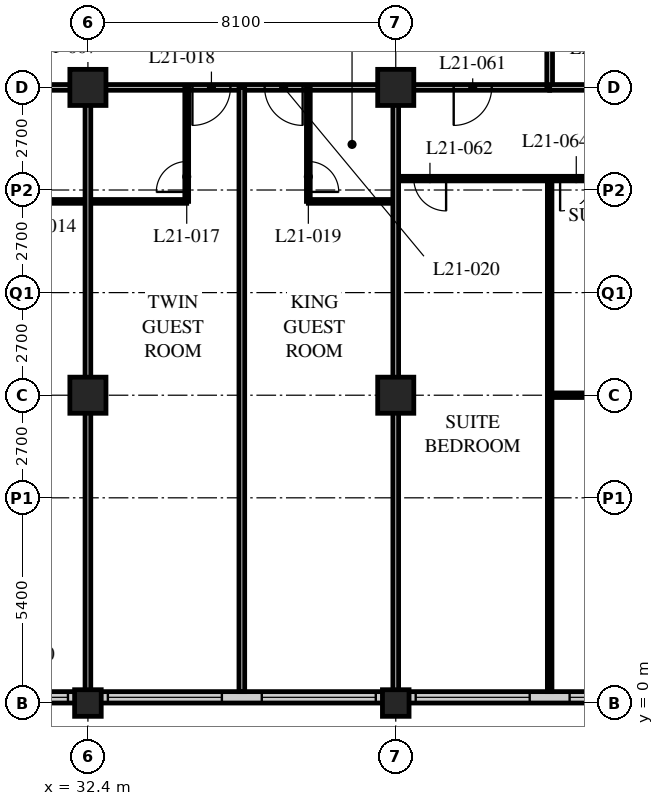
"""IFC4 building model, lengths in metres.
Left out: names, types, materials, properties, quantities, classifications, styles, units other than length and angle.
Written with IfcOpenShell. Run it as: python <this file> out.ifc"""

import sys

from ifc_helpers import new_model, si_unit, direction, frame, frame_2d, origin, origin_2d, place, context, subcontext, project, spatial, rectangle, hollow_rectangle, extrude, element, fill, save


model = new_model("IFC4")
c1 = context("Model", 3, precision=1e-05, world=origin(), true_north=direction((0.0, 1.0)))
c2 = subcontext(c1, "Body", "Model", "MODEL_VIEW")
j1 = project(units=[si_unit("LENGTHUNIT", "METRE"), si_unit("PLANEANGLEUNIT", "RADIAN")], contexts=[c1])
p1 = place(None, origin())
s1 = spatial("IfcSite", under=j1, at=p1, CompositionType="ELEMENT")
p2 = place(p1, origin())
s2 = spatial("IfcBuilding", under=s1, at=p2, CompositionType="ELEMENT")
p3 = place(p2, frame((0.0, 0.0, 84.0)))
s3 = spatial("IfcBuildingStorey", under=s2, at=p3, CompositionType="ELEMENT", Elevation=84.0)
p4 = place(p3, frame((32.4, 0.0, 0.0), z_axis=(0.0, 0.0, 1.0), x_axis=(1.0, 0.0, 0.0)))
e1 = element("IfcColumn", 1, at=p4, inside=s3, PredefinedType="COLUMN", context=c2, shape_type="SweptSolid", body=[
    extrude(hollow_rectangle(XDim=0.7, YDim=0.7, WallThickness=0.06, at=origin_2d()), origin(), (0.0, 0.0, 1.0), 3.4),
])
for number, where, z_axis, x_axis in (
    (2, (32.4, 8.1, 0.0), (0.0, 0.0, 1.0), (1.0, 0.0, 0.0)),
    (3, (32.4, 16.2, 0.0), (0.0, 0.0, 1.0), (1.0, 0.0, 0.0)),
):
    element("IfcColumn", number, at=place(p3, frame(where, z_axis=z_axis, x_axis=x_axis)), inside=s3, PredefinedType="COLUMN", context=c2, shape_type="SweptSolid", body=[
        extrude(hollow_rectangle(XDim=0.95, YDim=0.95, WallThickness=0.095, at=origin_2d()), origin(), (0.0, 0.0, 1.0), 3.4),
    ])
p5 = place(p3, frame((40.5, 0.0, 0.0), z_axis=(0.0, 0.0, 1.0), x_axis=(1.0, 0.0, 0.0)))
e4 = element("IfcColumn", 4, at=p5, inside=s3, PredefinedType="COLUMN", context=c2, shape_type="SweptSolid", body=[
    extrude(hollow_rectangle(XDim=0.7, YDim=0.7, WallThickness=0.06, at=origin_2d()), origin(), (0.0, 0.0, 1.0), 3.4),
])
for number, where, z_axis, x_axis in (
    (5, (40.5, 8.1, 0.0), (0.0, 0.0, 1.0), (1.0, 0.0, 0.0)),
    (6, (40.5, 16.2, 0.0), (0.0, 0.0, 1.0), (1.0, 0.0, 0.0)),
):
    element("IfcColumn", number, at=place(p3, frame(where, z_axis=z_axis, x_axis=x_axis)), inside=s3, PredefinedType="COLUMN", context=c2, shape_type="SweptSolid", body=[
        extrude(hollow_rectangle(XDim=0.95, YDim=0.95, WallThickness=0.095, at=origin_2d()), origin(), (0.0, 0.0, 1.0), 3.4),
    ])
p6 = place(p3, frame((8.4, 0.15, 0.0), z_axis=(0.0, 0.0, 1.0), x_axis=(1.0, 0.0, 0.0)))
e7 = element("IfcWall", 7, at=p6, inside=s3, PredefinedType="SOLIDWALL", context=c2, shape_type="SweptSolid", body=[
    extrude(rectangle(XDim=40.2, YDim=0.3, at=frame_2d((20.1, 0.0))), origin(), (0.0, 0.0, 1.0), 3.19),
])
p7 = place(p6, frame((0.225, 0.0, 0.9)))
e8 = element("IfcOpeningElement", 8, at=p7, cuts=e7, PredefinedType="OPENING", context=c2, shape_type="SweptSolid", body=[
    extrude(rectangle(XDim=3.0, YDim=1.5, at=frame_2d((1.5, 0.75))), frame((0.0, 0.16, 0.0), z_axis=(0.0, -1.0, 0.0), x_axis=(1.0, 0.0, 0.0)), (0.0, 0.0, 1.0), 0.32),
])
p8 = place(p6, frame((4.275, 0.0, 0.9)))
e9 = element("IfcOpeningElement", 9, at=p8, cuts=e7, PredefinedType="OPENING", context=c2, shape_type="SweptSolid", body=[
    extrude(rectangle(XDim=3.0, YDim=1.5, at=frame_2d((1.5, 0.75))), frame((0.0, 0.16, 0.0), z_axis=(0.0, -1.0, 0.0), x_axis=(1.0, 0.0, 0.0)), (0.0, 0.0, 1.0), 0.32),
])
p9 = place(p6, frame((8.325, 0.0, 0.9)))
e10 = element("IfcOpeningElement", 10, at=p9, cuts=e7, PredefinedType="OPENING", context=c2, shape_type="SweptSolid", body=[
    extrude(rectangle(XDim=3.0, YDim=1.5, at=frame_2d((1.5, 0.75))), frame((0.0, 0.16, 0.0), z_axis=(0.0, -1.0, 0.0), x_axis=(1.0, 0.0, 0.0)), (0.0, 0.0, 1.0), 0.32),
])
p10 = place(p6, frame((12.375, 0.0, 0.9)))
e11 = element("IfcOpeningElement", 11, at=p10, cuts=e7, PredefinedType="OPENING", context=c2, shape_type="SweptSolid", body=[
    extrude(rectangle(XDim=3.0, YDim=1.5, at=frame_2d((1.5, 0.75))), frame((0.0, 0.16, 0.0), z_axis=(0.0, -1.0, 0.0), x_axis=(1.0, 0.0, 0.0)), (0.0, 0.0, 1.0), 0.32),
])
p11 = place(p6, frame((16.425, 0.0, 0.9)))
e12 = element("IfcOpeningElement", 12, at=p11, cuts=e7, PredefinedType="OPENING", context=c2, shape_type="SweptSolid", body=[
    extrude(rectangle(XDim=3.0, YDim=1.5, at=frame_2d((1.5, 0.75))), frame((0.0, 0.16, 0.0), z_axis=(0.0, -1.0, 0.0), x_axis=(1.0, 0.0, 0.0)), (0.0, 0.0, 1.0), 0.32),
])
p12 = place(p6, frame((20.475, 0.0, 0.9)))
e13 = element("IfcOpeningElement", 13, at=p12, cuts=e7, PredefinedType="OPENING", context=c2, shape_type="SweptSolid", body=[
    extrude(rectangle(XDim=3.0, YDim=1.5, at=frame_2d((1.5, 0.75))), frame((0.0, 0.16, 0.0), z_axis=(0.0, -1.0, 0.0), x_axis=(1.0, 0.0, 0.0)), (0.0, 0.0, 1.0), 0.32),
])
p13 = place(p6, frame((24.525, 0.0, 0.9)))
e14 = element("IfcOpeningElement", 14, at=p13, cuts=e7, PredefinedType="OPENING", context=c2, shape_type="SweptSolid", body=[
    extrude(rectangle(XDim=3.0, YDim=1.5, at=frame_2d((1.5, 0.75))), frame((0.0, 0.16, 0.0), z_axis=(0.0, -1.0, 0.0), x_axis=(1.0, 0.0, 0.0)), (0.0, 0.0, 1.0), 0.32),
])
p14 = place(p6, frame((28.575, 0.0, 0.9)))
e15 = element("IfcOpeningElement", 15, at=p14, cuts=e7, PredefinedType="OPENING", context=c2, shape_type="SweptSolid", body=[
    extrude(rectangle(XDim=3.0, YDim=1.5, at=frame_2d((1.5, 0.75))), frame((0.0, 0.16, 0.0), z_axis=(0.0, -1.0, 0.0), x_axis=(1.0, 0.0, 0.0)), (0.0, 0.0, 1.0), 0.32),
])
p15 = place(p6, frame((32.625, 0.0, 0.9)))
e16 = element("IfcOpeningElement", 16, at=p15, cuts=e7, PredefinedType="OPENING", context=c2, shape_type="SweptSolid", body=[
    extrude(rectangle(XDim=3.0, YDim=1.5, at=frame_2d((1.5, 0.75))), frame((0.0, 0.16, 0.0), z_axis=(0.0, -1.0, 0.0), x_axis=(1.0, 0.0, 0.0)), (0.0, 0.0, 1.0), 0.32),
])
p16 = place(p6, frame((36.675, 0.0, 0.9)))
e17 = element("IfcOpeningElement", 17, at=p16, cuts=e7, PredefinedType="OPENING", context=c2, shape_type="SweptSolid", body=[
    extrude(rectangle(XDim=3.0, YDim=1.5, at=frame_2d((1.5, 0.75))), frame((0.0, 0.16, 0.0), z_axis=(0.0, -1.0, 0.0), x_axis=(1.0, 0.0, 0.0)), (0.0, 0.0, 1.0), 0.32),
])
p17 = place(p3, frame((12.15, 16.2, 0.0), z_axis=(0.0, 0.0, 1.0), x_axis=(1.0, 0.0, 0.0)))
e18 = element("IfcWall", 18, at=p17, inside=s3, PredefinedType="PARTITIONING", context=c2, shape_type="SweptSolid", body=[
    extrude(rectangle(XDim=32.4, YDim=0.15, at=frame_2d((16.2, 0.0))), origin(), (0.0, 0.0, 1.0), 2.428),
])
p18 = place(p17, frame((6.5, 0.0, 0.0)))
e19 = element("IfcOpeningElement", 19, at=p18, cuts=e18, PredefinedType="OPENING", context=c2, shape_type="SweptSolid", body=[
    extrude(rectangle(XDim=1.0, YDim=2.1, at=frame_2d((0.5, 1.05))), frame((0.0, 0.085, 0.0), z_axis=(0.0, -1.0, 0.0), x_axis=(1.0, 0.0, 0.0)), (0.0, 0.0, 1.0), 0.17),
])
p19 = place(p17, frame((8.4, 0.0, 0.0)))
e20 = element("IfcOpeningElement", 20, at=p19, cuts=e18, PredefinedType="OPENING", context=c2, shape_type="SweptSolid", body=[
    extrude(rectangle(XDim=1.0, YDim=2.1, at=frame_2d((0.5, 1.05))), frame((0.0, 0.085, 0.0), z_axis=(0.0, -1.0, 0.0), x_axis=(1.0, 0.0, 0.0)), (0.0, 0.0, 1.0), 0.17),
])
p20 = place(p17, frame((14.9, 0.0, 0.0)))
e21 = element("IfcOpeningElement", 21, at=p20, cuts=e18, PredefinedType="OPENING", context=c2, shape_type="SweptSolid", body=[
    extrude(rectangle(XDim=1.0, YDim=2.1, at=frame_2d((0.5, 1.05))), frame((0.0, 0.085, 0.0), z_axis=(0.0, -1.0, 0.0), x_axis=(1.0, 0.0, 0.0)), (0.0, 0.0, 1.0), 0.17),
])
p21 = place(p17, frame((16.5, 0.0, 0.0)))
e22 = element("IfcOpeningElement", 22, at=p21, cuts=e18, PredefinedType="OPENING", context=c2, shape_type="SweptSolid", body=[
    extrude(rectangle(XDim=1.0, YDim=2.1, at=frame_2d((0.5, 1.05))), frame((0.0, 0.085, 0.0), z_axis=(0.0, -1.0, 0.0), x_axis=(1.0, 0.0, 0.0)), (0.0, 0.0, 1.0), 0.17),
])
p22 = place(p17, frame((23.0, 0.0, 0.0)))
e23 = element("IfcOpeningElement", 23, at=p22, cuts=e18, PredefinedType="OPENING", context=c2, shape_type="SweptSolid", body=[
    extrude(rectangle(XDim=1.0, YDim=2.1, at=frame_2d((0.5, 1.05))), frame((0.0, 0.085, 0.0), z_axis=(0.0, -1.0, 0.0), x_axis=(1.0, 0.0, 0.0)), (0.0, 0.0, 1.0), 0.17),
])
p23 = place(p17, frame((24.9, 0.0, 0.0)))
e24 = element("IfcOpeningElement", 24, at=p23, cuts=e18, PredefinedType="OPENING", context=c2, shape_type="SweptSolid", body=[
    extrude(rectangle(XDim=1.0, YDim=2.1, at=frame_2d((0.5, 1.05))), frame((0.0, 0.085, 0.0), z_axis=(0.0, -1.0, 0.0), x_axis=(1.0, 0.0, 0.0)), (0.0, 0.0, 1.0), 0.17),
])
p24 = place(p17, frame((1.525, 0.0, 0.0)))
e25 = element("IfcOpeningElement", 25, at=p24, cuts=e18, PredefinedType="OPENING", context=c2, shape_type="SweptSolid", body=[
    extrude(rectangle(XDim=1.0, YDim=2.1, at=frame_2d((0.5, 1.05))), frame((0.0, 0.085, 0.0), z_axis=(0.0, -1.0, 0.0), x_axis=(1.0, 0.0, 0.0)), (0.0, 0.0, 1.0), 0.17),
])
p25 = place(p17, frame((29.875, 0.0, 0.0)))
e26 = element("IfcOpeningElement", 26, at=p25, cuts=e18, PredefinedType="OPENING", context=c2, shape_type="SweptSolid", body=[
    extrude(rectangle(XDim=1.0, YDim=2.1, at=frame_2d((0.5, 1.05))), frame((0.0, 0.085, 0.0), z_axis=(0.0, -1.0, 0.0), x_axis=(1.0, 0.0, 0.0)), (0.0, 0.0, 1.0), 0.17),
])
p26 = place(p3, frame((44.55, 16.2, 0.0), z_axis=(0.0, 0.0, 1.0), x_axis=(0.0, 1.0, 0.0)))
e27 = element("IfcWall", 27, at=p26, inside=s3, PredefinedType="PARTITIONING", context=c2, shape_type="SweptSolid", body=[
    extrude(rectangle(XDim=26.1, YDim=0.15, at=frame_2d((13.05, 0.0))), origin(), (0.0, 0.0, 1.0), 3.19),
])
p27 = place(p26, frame((2.75, 0.0, 0.0)))
e28 = element("IfcOpeningElement", 28, at=p27, cuts=e27, PredefinedType="OPENING", context=c2, shape_type="SweptSolid", body=[
    extrude(rectangle(XDim=1.0, YDim=2.1, at=frame_2d((0.5, 1.05))), frame((0.0, 0.085, 0.0), z_axis=(0.0, -1.0, 0.0), x_axis=(1.0, 0.0, 0.0)), (0.0, 0.0, 1.0), 0.17),
])
p28 = place(p26, frame((6.5, 0.0, 0.0)))
e29 = element("IfcOpeningElement", 29, at=p28, cuts=e27, PredefinedType="OPENING", context=c2, shape_type="SweptSolid", body=[
    extrude(rectangle(XDim=1.0, YDim=2.1, at=frame_2d((0.5, 1.05))), frame((0.0, 0.085, 0.0), z_axis=(0.0, -1.0, 0.0), x_axis=(1.0, 0.0, 0.0)), (0.0, 0.0, 1.0), 0.17),
])
p29 = place(p26, frame((10.0, 0.0, 0.0)))
e30 = element("IfcOpeningElement", 30, at=p29, cuts=e27, PredefinedType="OPENING", context=c2, shape_type="SweptSolid", body=[
    extrude(rectangle(XDim=1.0, YDim=2.1, at=frame_2d((0.5, 1.05))), frame((0.0, 0.085, 0.0), z_axis=(0.0, -1.0, 0.0), x_axis=(1.0, 0.0, 0.0)), (0.0, 0.0, 1.0), 0.17),
])
p30 = place(p26, frame((18.1, 0.0, 0.0)))
e31 = element("IfcOpeningElement", 31, at=p30, cuts=e27, PredefinedType="OPENING", context=c2, shape_type="SweptSolid", body=[
    extrude(rectangle(XDim=1.0, YDim=2.1, at=frame_2d((0.5, 1.05))), frame((0.0, 0.085, 0.0), z_axis=(0.0, -1.0, 0.0), x_axis=(1.0, 0.0, 0.0)), (0.0, 0.0, 1.0), 0.17),
])
p31 = place(p3, frame((29.8, 13.2, 0.0), z_axis=(0.0, 0.0, 1.0), x_axis=(1.0, 0.0, 0.0)))
e32 = element("IfcWall", 32, at=p31, inside=s3, PredefinedType="PARTITIONING", context=c2, shape_type="SweptSolid", body=[
    extrude(rectangle(XDim=5.2, YDim=0.1, at=frame_2d((2.6, 0.0))), origin(), (0.0, 0.0, 1.0), 3.19),
])
p32 = place(p3, frame((32.4, 16.2, 0.0), z_axis=(0.0, 0.0, 1.0), x_axis=(0.0, -1.0, 0.0)))
e33 = element("IfcWall", 33, at=p32, inside=s3, PredefinedType="PARTITIONING", context=c2, shape_type="SweptSolid", body=[
    extrude(rectangle(XDim=15.9, YDim=0.15, at=frame_2d((7.95, 0.0))), origin(), (0.0, 0.0, 1.0), 2.428),
])
p33 = place(p3, frame((35.0, 16.2, 0.0), z_axis=(0.0, 0.0, 1.0), x_axis=(0.0, -1.0, 0.0)))
e34 = element("IfcWall", 34, at=p33, inside=s3, PredefinedType="PARTITIONING", context=c2, shape_type="SweptSolid", body=[
    extrude(rectangle(XDim=3.0, YDim=0.1, at=frame_2d((1.5, 0.0))), origin(), (0.0, 0.0, 1.0), 3.19),
])
p34 = place(p33, frame((1.95, 0.0, 0.0)))
e35 = element("IfcOpeningElement", 35, at=p34, cuts=e34, PredefinedType="OPENING", context=c2, shape_type="SweptSolid", body=[
    extrude(rectangle(XDim=0.8, YDim=2.1, at=frame_2d((0.4, 1.05))), frame((0.0, 0.06, 0.0), z_axis=(0.0, -1.0, 0.0), x_axis=(1.0, 0.0, 0.0)), (0.0, 0.0, 1.0), 0.12),
])
p35 = place(p3, frame((36.45, 16.2, 0.0), z_axis=(0.0, 0.0, 1.0), x_axis=(0.0, -1.0, 0.0)))
e36 = element("IfcWall", 36, at=p35, inside=s3, PredefinedType="PARTITIONING", context=c2, shape_type="SweptSolid", body=[
    extrude(rectangle(XDim=15.9, YDim=0.15, at=frame_2d((7.95, 0.0))), origin(), (0.0, 0.0, 1.0), 3.19),
])
p36 = place(p3, frame((38.2, 13.2, 0.0), z_axis=(0.0, 0.0, 1.0), x_axis=(1.0, 0.0, 0.0)))
e37 = element("IfcWall", 37, at=p36, inside=s3, PredefinedType="PARTITIONING", context=c2, shape_type="SweptSolid", body=[
    extrude(rectangle(XDim=2.3, YDim=0.1, at=frame_2d((1.15, 0.0))), origin(), (0.0, 0.0, 1.0), 3.19),
])
p37 = place(p3, frame((38.2, 16.2, 0.0), z_axis=(0.0, 0.0, 1.0), x_axis=(0.0, -1.0, 0.0)))
e38 = element("IfcWall", 38, at=p37, inside=s3, PredefinedType="PARTITIONING", context=c2, shape_type="SweptSolid", body=[
    extrude(rectangle(XDim=3.0, YDim=0.1, at=frame_2d((1.5, 0.0))), origin(), (0.0, 0.0, 1.0), 3.19),
])
p38 = place(p37, frame((1.95, 0.0, 0.0)))
e39 = element("IfcOpeningElement", 39, at=p38, cuts=e38, PredefinedType="OPENING", context=c2, shape_type="SweptSolid", body=[
    extrude(rectangle(XDim=0.8, YDim=2.1, at=frame_2d((0.4, 1.05))), frame((0.0, 0.06, 0.0), z_axis=(0.0, -1.0, 0.0), x_axis=(1.0, 0.0, 0.0)), (0.0, 0.0, 1.0), 0.12),
])
p39 = place(p3, frame((40.5, 13.8, 0.0), z_axis=(0.0, 0.0, 1.0), x_axis=(1.0, 0.0, 0.0)))
e40 = element("IfcWall", 40, at=p39, inside=s3, PredefinedType="PARTITIONING", context=c2, shape_type="SweptSolid", body=[
    extrude(rectangle(XDim=8.05, YDim=0.12, at=frame_2d((4.025, 0.0))), origin(), (0.0, 0.0, 1.0), 3.19),
])
p40 = place(p39, frame((0.475, 0.0, 0.0)))
e41 = element("IfcOpeningElement", 41, at=p40, cuts=e40, PredefinedType="OPENING", context=c2, shape_type="SweptSolid", body=[
    extrude(rectangle(XDim=0.85, YDim=2.1, at=frame_2d((0.425, 1.05))), frame((0.0, 0.07, 0.0), z_axis=(0.0, -1.0, 0.0), x_axis=(1.0, 0.0, 0.0)), (0.0, 0.0, 1.0), 0.14),
])
p41 = place(p39, frame((4.325, 0.0, 0.0)))
e42 = element("IfcOpeningElement", 42, at=p41, cuts=e40, PredefinedType="OPENING", context=c2, shape_type="SweptSolid", body=[
    extrude(rectangle(XDim=0.85, YDim=2.1, at=frame_2d((0.425, 1.05))), frame((0.0, 0.07, 0.0), z_axis=(0.0, -1.0, 0.0), x_axis=(1.0, 0.0, 0.0)), (0.0, 0.0, 1.0), 0.14),
])
p42 = place(p3, frame((44.55, 13.8, 0.0), z_axis=(0.0, 0.0, 1.0), x_axis=(0.0, -1.0, 0.0)))
e43 = element("IfcWall", 43, at=p42, inside=s3, PredefinedType="PARTITIONING", context=c2, shape_type="SweptSolid", body=[
    extrude(rectangle(XDim=13.5, YDim=0.12, at=frame_2d((6.75, 0.0))), origin(), (0.0, 0.0, 1.0), 3.19),
])
p43 = place(p3, frame((44.55, 16.2, 0.0), z_axis=(0.0, 0.0, 1.0), x_axis=(1.0, 0.0, 0.0)))
e44 = element("IfcWall", 44, at=p43, inside=s3, PredefinedType="PARTITIONING", context=c2, shape_type="SweptSolid", body=[
    extrude(rectangle(XDim=11.85, YDim=0.15, at=frame_2d((5.925, 0.0))), origin(), (0.0, 0.0, 1.0), 2.428),
])
p44 = place(p3, frame((40.5, 16.2, 0.0), z_axis=(0.0, 0.0, 1.0), x_axis=(0.0, -1.0, 0.0)))
e45 = element("IfcWall", 45, at=p44, inside=s3, PredefinedType="PARTITIONING", context=c2, shape_type="SweptSolid", body=[
    extrude(rectangle(XDim=15.9, YDim=0.15, at=frame_2d((7.95, 0.0))), origin(), (0.0, 0.0, 1.0), 2.428),
])
p45 = place(p3, frame((44.55, 8.1, 0.0), z_axis=(0.0, 0.0, 1.0), x_axis=(1.0, 0.0, 0.0)))
e46 = element("IfcWall", 46, at=p45, inside=s3, PredefinedType="PARTITIONING", context=c2, shape_type="SweptSolid", body=[
    extrude(rectangle(XDim=3.575, YDim=0.12, at=frame_2d((1.788, 0.0))), origin(), (0.0, 0.0, 1.0), 2.428),
])
p46 = place(p12, origin())
e47 = element("IfcWindow", 47, at=p46, inside=s3, PartitioningType="SINGLE_PANEL", PredefinedType="WINDOW", context=c2, shape_type="SweptSolid", body=[
    extrude(rectangle(XDim=3.0, YDim=1.5, at=frame_2d((1.5, 0.75))), frame((0.0, 0.03, 0.0), z_axis=(0.0, -1.0, 0.0), x_axis=(1.0, 0.0, 0.0)), (0.0, 0.0, 1.0), 0.06),
])
fill(e13, e47)
p47 = place(p13, origin())
e48 = element("IfcWindow", 48, at=p47, inside=s3, PartitioningType="SINGLE_PANEL", PredefinedType="WINDOW", context=c2, shape_type="SweptSolid", body=[
    extrude(rectangle(XDim=3.0, YDim=1.5, at=frame_2d((1.5, 0.75))), frame((0.0, 0.03, 0.0), z_axis=(0.0, -1.0, 0.0), x_axis=(1.0, 0.0, 0.0)), (0.0, 0.0, 1.0), 0.06),
])
fill(e14, e48)
p48 = place(p14, origin())
e49 = element("IfcWindow", 49, at=p48, inside=s3, PartitioningType="SINGLE_PANEL", PredefinedType="WINDOW", context=c2, shape_type="SweptSolid", body=[
    extrude(rectangle(XDim=3.0, YDim=1.5, at=frame_2d((1.5, 0.75))), frame((0.0, 0.03, 0.0), z_axis=(0.0, -1.0, 0.0), x_axis=(1.0, 0.0, 0.0)), (0.0, 0.0, 1.0), 0.06),
])
fill(e15, e49)
p49 = place(p15, origin())
e50 = element("IfcWindow", 50, at=p49, inside=s3, PartitioningType="SINGLE_PANEL", PredefinedType="WINDOW", context=c2, shape_type="SweptSolid", body=[
    extrude(rectangle(XDim=3.0, YDim=1.5, at=frame_2d((1.5, 0.75))), frame((0.0, 0.03, 0.0), z_axis=(0.0, -1.0, 0.0), x_axis=(1.0, 0.0, 0.0)), (0.0, 0.0, 1.0), 0.06),
])
fill(e16, e50)
p50 = place(p16, origin())
e51 = element("IfcWindow", 51, at=p50, inside=s3, PartitioningType="SINGLE_PANEL", PredefinedType="WINDOW", context=c2, shape_type="SweptSolid", body=[
    extrude(rectangle(XDim=3.0, YDim=1.5, at=frame_2d((1.5, 0.75))), frame((0.0, 0.03, 0.0), z_axis=(0.0, -1.0, 0.0), x_axis=(1.0, 0.0, 0.0)), (0.0, 0.0, 1.0), 0.06),
])
fill(e17, e51)
p51 = place(p34, origin())
e52 = element("IfcDoor", 52, at=p51, inside=s3, OperationType="SINGLE_SWING_LEFT", PredefinedType="DOOR", context=c2, shape_type="SweptSolid", body=[
    extrude(rectangle(XDim=0.8, YDim=2.1, at=frame_2d((0.4, 1.05))), frame((0.0, 0.025, 0.0), z_axis=(0.0, -1.0, 0.0), x_axis=(1.0, 0.0, 0.0)), (0.0, 0.0, 1.0), 0.05),
])
fill(e35, e52)
p52 = place(p22, origin())
e53 = element("IfcDoor", 53, at=p52, inside=s3, OperationType="SINGLE_SWING_RIGHT", PredefinedType="DOOR", context=c2, shape_type="SweptSolid", body=[
    extrude(rectangle(XDim=1.0, YDim=2.1, at=frame_2d((0.5, 1.05))), frame((0.0, 0.025, 0.0), z_axis=(0.0, -1.0, 0.0), x_axis=(1.0, 0.0, 0.0)), (0.0, 0.0, 1.0), 0.05),
])
fill(e23, e53)
p53 = place(p38, origin())
e54 = element("IfcDoor", 54, at=p53, inside=s3, OperationType="SINGLE_SWING_RIGHT", PredefinedType="DOOR", context=c2, shape_type="SweptSolid", body=[
    extrude(rectangle(XDim=0.8, YDim=2.1, at=frame_2d((0.4, 1.05))), frame((0.0, 0.025, 0.0), z_axis=(0.0, -1.0, 0.0), x_axis=(1.0, 0.0, 0.0)), (0.0, 0.0, 1.0), 0.05),
])
fill(e39, e54)
p54 = place(p23, origin())
e55 = element("IfcDoor", 55, at=p54, inside=s3, OperationType="SINGLE_SWING_LEFT", PredefinedType="DOOR", context=c2, shape_type="SweptSolid", body=[
    extrude(rectangle(XDim=1.0, YDim=2.1, at=frame_2d((0.5, 1.05))), frame((0.0, 0.025, 0.0), z_axis=(0.0, -1.0, 0.0), x_axis=(1.0, 0.0, 0.0)), (0.0, 0.0, 1.0), 0.05),
])
fill(e24, e55)
p55 = place(p25, origin())
e56 = element("IfcDoor", 56, at=p55, inside=s3, OperationType="SINGLE_SWING_RIGHT", PredefinedType="DOOR", context=c2, shape_type="SweptSolid", body=[
    extrude(rectangle(XDim=1.0, YDim=2.1, at=frame_2d((0.5, 1.05))), frame((0.0, 0.025, 0.0), z_axis=(0.0, -1.0, 0.0), x_axis=(1.0, 0.0, 0.0)), (0.0, 0.0, 1.0), 0.05),
])
fill(e26, e56)
p56 = place(p40, origin())
e57 = element("IfcDoor", 57, at=p56, inside=s3, OperationType="SINGLE_SWING_LEFT", PredefinedType="DOOR", context=c2, shape_type="SweptSolid", body=[
    extrude(rectangle(XDim=0.85, YDim=2.1, at=frame_2d((0.425, 1.05))), frame((0.0, 0.025, 0.0), z_axis=(0.0, -1.0, 0.0), x_axis=(1.0, 0.0, 0.0)), (0.0, 0.0, 1.0), 0.05),
])
fill(e41, e57)
p57 = place(p41, origin())
e58 = element("IfcDoor", 58, at=p57, inside=s3, OperationType="SINGLE_SWING_RIGHT", PredefinedType="DOOR", context=c2, shape_type="SweptSolid", body=[
    extrude(rectangle(XDim=0.85, YDim=2.1, at=frame_2d((0.425, 1.05))), frame((0.0, 0.025, 0.0), z_axis=(0.0, -1.0, 0.0), x_axis=(1.0, 0.0, 0.0)), (0.0, 0.0, 1.0), 0.05),
])
fill(e42, e58)
save(model, sys.argv[1])
